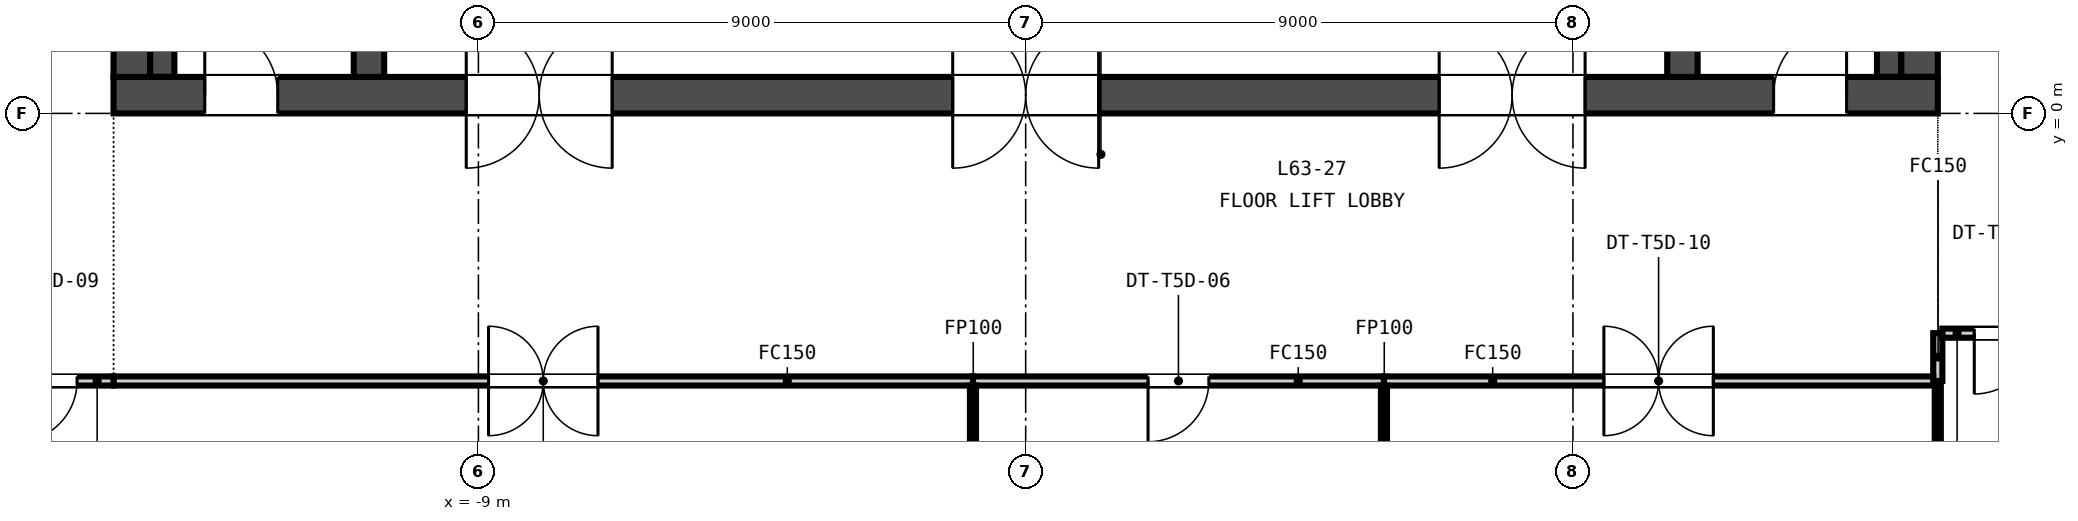
"""IFC4 building model, lengths in metres.
Left out: names, types, materials, properties, quantities, classifications, styles, units other than length and angle.
Written with IfcOpenShell. Run it as: python <this file> out.ifc"""

import sys

from ifc_helpers import new_model, si_unit, direction, frame, frame_2d, origin, place, context, subcontext, project, spatial, rectangle, extrude, element, fill, save


model = new_model("IFC4")
c1 = context("Model", 3, precision=1e-05, world=origin(), true_north=direction((0.0, 1.0)))
c2 = subcontext(c1, "Body", "Model", "MODEL_VIEW")
j1 = project(units=[si_unit("LENGTHUNIT", "METRE"), si_unit("PLANEANGLEUNIT", "RADIAN")], contexts=[c1])
p1 = place(None, origin())
s1 = spatial("IfcSite", under=j1, at=p1, CompositionType="ELEMENT")
p2 = place(p1, origin())
s2 = spatial("IfcBuilding", under=s1, at=p2, CompositionType="ELEMENT")
p3 = place(p2, frame((0.0, 0.0, 249.15)))
s3 = spatial("IfcBuildingStorey", under=s2, at=p3, CompositionType="ELEMENT", Elevation=249.15)
p4 = place(p3, frame((-15.0, 0.3, -0.15), z_axis=(0.0, 0.0, 1.0), x_axis=(1.0, 0.0, 0.0)))
e1 = element("IfcWall", 1, at=p4, inside=s3, PredefinedType="SOLIDWALL", context=c2, shape_type="SweptSolid", body=[
    extrude(rectangle(XDim=30.0, YDim=0.6, at=frame_2d((15.0, 0.0))), origin(), (0.0, 0.0, 1.0), 3.65),
])
p5 = place(p4, frame((5.8, 0.0, 0.15)))
e2 = element("IfcOpeningElement", 2, at=p5, cuts=e1, PredefinedType="OPENING", context=c2, shape_type="SweptSolid", body=[
    extrude(rectangle(XDim=2.4, YDim=2.4, at=frame_2d((1.2, 1.2))), frame((0.0, 0.31, 0.0), z_axis=(0.0, -1.0, 0.0), x_axis=(1.0, 0.0, 0.0)), (0.0, 0.0, 1.0), 0.62),
])
p6 = place(p4, frame((13.8, 0.0, 0.15)))
e3 = element("IfcOpeningElement", 3, at=p6, cuts=e1, PredefinedType="OPENING", context=c2, shape_type="SweptSolid", body=[
    extrude(rectangle(XDim=2.4, YDim=2.4, at=frame_2d((1.2, 1.2))), frame((0.0, 0.31, 0.0), z_axis=(0.0, -1.0, 0.0), x_axis=(1.0, 0.0, 0.0)), (0.0, 0.0, 1.0), 0.62),
])
p7 = place(p4, frame((21.8, 0.0, 0.15)))
e4 = element("IfcOpeningElement", 4, at=p7, cuts=e1, PredefinedType="OPENING", context=c2, shape_type="SweptSolid", body=[
    extrude(rectangle(XDim=2.4, YDim=2.4, at=frame_2d((1.2, 1.2))), frame((0.0, 0.31, 0.0), z_axis=(0.0, -1.0, 0.0), x_axis=(1.0, 0.0, 0.0)), (0.0, 0.0, 1.0), 0.62),
])
p8 = place(p4, frame((1.5, 0.0, 0.15)))
e5 = element("IfcOpeningElement", 5, at=p8, cuts=e1, PredefinedType="OPENING", context=c2, shape_type="SweptSolid", body=[
    extrude(rectangle(XDim=1.2, YDim=2.1, at=frame_2d((0.6, 1.05))), frame((0.0, 0.31, 0.0), z_axis=(0.0, -1.0, 0.0), x_axis=(1.0, 0.0, 0.0)), (0.0, 0.0, 1.0), 0.62),
])
p9 = place(p4, frame((27.3, 0.0, 0.15)))
e6 = element("IfcOpeningElement", 6, at=p9, cuts=e1, PredefinedType="OPENING", context=c2, shape_type="SweptSolid", body=[
    extrude(rectangle(XDim=1.2, YDim=2.1, at=frame_2d((0.6, 1.05))), frame((0.0, 0.31, 0.0), z_axis=(0.0, -1.0, 0.0), x_axis=(1.0, 0.0, 0.0)), (0.0, 0.0, 1.0), 0.62),
])
for number, where, z_axis, x_axis in (
    (7, (-14.7, 0.6, -0.15), (0.0, 0.0, 1.0), (0.0, 1.0, 0.0)),
    (8, (14.7, 0.6, -0.15), (0.0, 0.0, 1.0), (0.0, 1.0, 0.0)),
):
    element("IfcWall", number, at=place(p3, frame(where, z_axis=z_axis, x_axis=x_axis)), inside=s3, PredefinedType="SOLIDWALL", context=c2, shape_type="SweptSolid", body=[
        extrude(rectangle(XDim=13.8, YDim=0.6, at=frame_2d((6.9, 0.0))), origin(), (0.0, 0.0, 1.0), 3.65),
    ])
for number, where, z_axis, x_axis in (
    (9, (-10.8, 0.6, -0.15), (0.0, 0.0, 1.0), (0.0, 1.0, 0.0)),
    (10, (10.8, 0.6, -0.15), (0.0, 0.0, 1.0), (0.0, 1.0, 0.0)),
):
    element("IfcWall", number, at=place(p3, frame(where, z_axis=z_axis, x_axis=x_axis)), inside=s3, PredefinedType="SOLIDWALL", context=c2, shape_type="SweptSolid", body=[
        extrude(rectangle(XDim=13.8, YDim=0.5, at=frame_2d((6.9, 0.0))), origin(), (0.0, 0.0, 1.0), 3.65),
    ])
for number, where, z_axis, x_axis in (
    (11, (-14.2, 0.6, 0.0), (0.0, 0.0, 1.0), (0.0, 1.0, 0.0)),
    (12, (14.2, 0.6, 0.0), (0.0, 0.0, 1.0), (0.0, 1.0, 0.0)),
):
    element("IfcWall", number, at=place(p3, frame(where, z_axis=z_axis, x_axis=x_axis)), inside=s3, PredefinedType="SOLIDWALL", context=c2, shape_type="SweptSolid", body=[
        extrude(rectangle(XDim=13.8, YDim=0.4, at=frame_2d((6.9, 0.0))), origin(), (0.0, 0.0, 1.0), 3.5),
    ])
p10 = place(p3, frame((5.892, -4.4, 0.0), z_axis=(0.0, 0.0, 1.0), x_axis=(-1.0, 0.0, 0.0)))
e13 = element("IfcWall", 13, at=p10, inside=s3, PredefinedType="PARTITIONING", context=c2, shape_type="SweptSolid", body=[
    extrude(rectangle(XDim=6.759, YDim=0.15, at=frame_2d((3.379, 0.0))), origin(), (0.0, 0.0, 1.0), 2.751),
])
p11 = place(p10, frame((2.879, 0.0, 0.0)))
e14 = element("IfcOpeningElement", 14, at=p11, cuts=e13, PredefinedType="OPENING", context=c2, shape_type="SweptSolid", body=[
    extrude(rectangle(XDim=1.0, YDim=2.1, at=frame_2d((0.5, 1.05))), frame((0.0, 0.085, 0.0), z_axis=(0.0, -1.0, 0.0), x_axis=(1.0, 0.0, 0.0)), (0.0, 0.0, 1.0), 0.17),
])
p12 = place(p3, frame((15.0, -3.614, 0.0), z_axis=(0.0, 0.0, 1.0), x_axis=(0.0, -1.0, 0.0)))
e15 = element("IfcWall", 15, at=p12, inside=s3, PredefinedType="PARTITIONING", context=c2, shape_type="SweptSolid", body=[
    extrude(rectangle(XDim=0.786, YDim=0.15, at=frame_2d((0.393, 0.0))), origin(), (0.0, 0.0, 1.0), 2.751),
])
p13 = place(p3, frame((-0.867, -4.4, 0.0), z_axis=(0.0, 0.0, 1.0), x_axis=(-1.0, 0.0, 0.0)))
e16 = element("IfcWall", 16, at=p13, inside=s3, PredefinedType="PARTITIONING", context=c2, shape_type="SweptSolid", body=[
    extrude(rectangle(XDim=14.133, YDim=0.15, at=frame_2d((7.066, 0.0))), origin(), (0.0, 0.0, 1.0), 2.751),
])
p14 = place(p13, frame((6.167, 0.0, 0.0)))
e17 = element("IfcOpeningElement", 17, at=p14, cuts=e16, PredefinedType="OPENING", context=c2, shape_type="SweptSolid", body=[
    extrude(rectangle(XDim=1.8, YDim=2.1, at=frame_2d((0.9, 1.05))), frame((0.0, 0.085, 0.0), z_axis=(0.0, -1.0, 0.0), x_axis=(1.0, 0.0, 0.0)), (0.0, 0.0, 1.0), 0.17),
])
p15 = place(p3, frame((14.925, -4.4, 0.0), z_axis=(0.0, 0.0, 1.0), x_axis=(-1.0, 0.0, 0.0)))
e18 = element("IfcWall", 18, at=p15, inside=s3, PredefinedType="PARTITIONING", context=c2, shape_type="SweptSolid", body=[
    extrude(rectangle(XDim=9.033, YDim=0.15, at=frame_2d((4.517, 0.0))), origin(), (0.0, 0.0, 1.0), 2.751),
])
p16 = place(p15, frame((3.616, 0.0, 0.0)))
e19 = element("IfcOpeningElement", 19, at=p16, cuts=e18, PredefinedType="OPENING", context=c2, shape_type="SweptSolid", body=[
    extrude(rectangle(XDim=1.8, YDim=2.1, at=frame_2d((0.9, 1.05))), frame((0.0, 0.085, 0.0), z_axis=(0.0, -1.0, 0.0), x_axis=(1.0, 0.0, 0.0)), (0.0, 0.0, 1.0), 0.17),
])
p17 = place(p3, frame((17.125, -3.614, 0.0), z_axis=(0.0, 0.0, 1.0), x_axis=(-1.0, 0.0, 0.0)))
e20 = element("IfcWall", 20, at=p17, inside=s3, PredefinedType="PARTITIONING", context=c2, shape_type="SweptSolid", body=[
    extrude(rectangle(XDim=2.05, YDim=0.15, at=frame_2d((1.025, 0.0))), origin(), (0.0, 0.0, 1.0), 2.751),
])
p18 = place(p17, frame((0.525, 0.0, 0.0)))
e21 = element("IfcOpeningElement", 21, at=p18, cuts=e20, PredefinedType="OPENING", context=c2, shape_type="SweptSolid", body=[
    extrude(rectangle(XDim=1.0, YDim=2.1, at=frame_2d((0.5, 1.05))), frame((0.0, 0.085, 0.0), z_axis=(0.0, -1.0, 0.0), x_axis=(1.0, 0.0, 0.0)), (0.0, 0.0, 1.0), 0.17),
])
p19 = place(p3, frame((-15.0, -4.4, 0.0), z_axis=(0.0, 0.0, 1.0), x_axis=(-1.0, 0.0, 0.0)))
e22 = element("IfcWall", 22, at=p19, inside=s3, PredefinedType="PARTITIONING", context=c2, shape_type="SweptSolid", body=[
    extrude(rectangle(XDim=2.2, YDim=0.15, at=frame_2d((1.1, 0.0))), origin(), (0.0, 0.0, 1.0), 2.751),
])
p20 = place(p19, frame((0.6, 0.0, 0.0)))
e23 = element("IfcOpeningElement", 23, at=p20, cuts=e22, PredefinedType="OPENING", context=c2, shape_type="SweptSolid", body=[
    extrude(rectangle(XDim=1.0, YDim=2.1, at=frame_2d((0.5, 1.05))), frame((0.0, 0.085, 0.0), z_axis=(0.0, -1.0, 0.0), x_axis=(1.0, 0.0, 0.0)), (0.0, 0.0, 1.0), 0.17),
])
for number, where, z_axis, x_axis in (
    (24, (5.892, -8.85, 0.0), (0.0, 0.0, 1.0), (0.0, 1.0, 0.0)),
    (25, (-0.867, -8.85, 0.0), (0.0, 0.0, 1.0), (0.0, 1.0, 0.0)),
):
    element("IfcWall", number, at=place(p3, frame(where, z_axis=z_axis, x_axis=x_axis)), inside=s3, PredefinedType="PARTITIONING", context=c2, shape_type="SweptSolid", body=[
        extrude(rectangle(XDim=4.375, YDim=0.1, at=frame_2d((2.188, 0.0))), origin(), (0.0, 0.0, 1.0), 2.751),
    ])
p21 = place(p3, frame((15.0, -8.685, 0.0), z_axis=(0.0, 0.0, 1.0), x_axis=(0.0, 1.0, 0.0)))
e26 = element("IfcWall", 26, at=p21, inside=s3, PredefinedType="PARTITIONING", context=c2, shape_type="SweptSolid", body=[
    extrude(rectangle(XDim=4.21, YDim=0.1, at=frame_2d((2.105, 0.0))), origin(), (0.0, 0.0, 1.0), 2.751),
])
p22 = place(p5, origin())
e27 = element("IfcDoor", 27, at=p22, inside=s3, OperationType="DOUBLE_DOOR_DOUBLE_SWING", PredefinedType="DOOR", context=c2, shape_type="SweptSolid", body=[
    extrude(rectangle(XDim=2.4, YDim=2.4, at=frame_2d((1.2, 1.2))), frame((0.0, 0.025, 0.0), z_axis=(0.0, -1.0, 0.0), x_axis=(1.0, 0.0, 0.0)), (0.0, 0.0, 1.0), 0.05),
])
fill(e2, e27)
p23 = place(p6, origin())
e28 = element("IfcDoor", 28, at=p23, inside=s3, OperationType="DOUBLE_DOOR_DOUBLE_SWING", PredefinedType="DOOR", context=c2, shape_type="SweptSolid", body=[
    extrude(rectangle(XDim=2.4, YDim=2.4, at=frame_2d((1.2, 1.2))), frame((0.0, 0.025, 0.0), z_axis=(0.0, -1.0, 0.0), x_axis=(1.0, 0.0, 0.0)), (0.0, 0.0, 1.0), 0.05),
])
fill(e3, e28)
p24 = place(p7, origin())
e29 = element("IfcDoor", 29, at=p24, inside=s3, OperationType="DOUBLE_DOOR_DOUBLE_SWING", PredefinedType="DOOR", context=c2, shape_type="SweptSolid", body=[
    extrude(rectangle(XDim=2.4, YDim=2.4, at=frame_2d((1.2, 1.2))), frame((0.0, 0.025, 0.0), z_axis=(0.0, -1.0, 0.0), x_axis=(1.0, 0.0, 0.0)), (0.0, 0.0, 1.0), 0.05),
])
fill(e4, e29)
p25 = place(p8, origin())
e30 = element("IfcDoor", 30, at=p25, inside=s3, OperationType="SINGLE_SWING_LEFT", PredefinedType="DOOR", context=c2, shape_type="SweptSolid", body=[
    extrude(rectangle(XDim=1.2, YDim=2.1, at=frame_2d((0.6, 1.05))), frame((0.0, 0.025, 0.0), z_axis=(0.0, -1.0, 0.0), x_axis=(1.0, 0.0, 0.0)), (0.0, 0.0, 1.0), 0.05),
])
fill(e5, e30)
p26 = place(p9, origin())
e31 = element("IfcDoor", 31, at=p26, inside=s3, OperationType="SINGLE_SWING_RIGHT", PredefinedType="DOOR", context=c2, shape_type="SweptSolid", body=[
    extrude(rectangle(XDim=1.2, YDim=2.1, at=frame_2d((0.6, 1.05))), frame((0.0, 0.025, 0.0), z_axis=(0.0, -1.0, 0.0), x_axis=(1.0, 0.0, 0.0)), (0.0, 0.0, 1.0), 0.05),
])
fill(e6, e31)
p27 = place(p11, origin())
e32 = element("IfcDoor", 32, at=p27, inside=s3, OperationType="SINGLE_SWING_RIGHT", PredefinedType="DOOR", context=c2, shape_type="SweptSolid", body=[
    extrude(rectangle(XDim=1.0, YDim=2.1, at=frame_2d((0.5, 1.05))), frame((0.0, 0.025, 0.0), z_axis=(0.0, -1.0, 0.0), x_axis=(1.0, 0.0, 0.0)), (0.0, 0.0, 1.0), 0.05),
])
fill(e14, e32)
p28 = place(p18, origin())
e33 = element("IfcDoor", 33, at=p28, inside=s3, OperationType="SINGLE_SWING_RIGHT", PredefinedType="DOOR", context=c2, shape_type="SweptSolid", body=[
    extrude(rectangle(XDim=1.0, YDim=2.1, at=frame_2d((0.5, 1.05))), frame((0.0, 0.025, 0.0), z_axis=(0.0, -1.0, 0.0), x_axis=(1.0, 0.0, 0.0)), (0.0, 0.0, 1.0), 0.05),
])
fill(e21, e33)
p29 = place(p14, origin())
e34 = element("IfcDoor", 34, at=p29, inside=s3, OperationType="DOUBLE_DOOR_DOUBLE_SWING", PredefinedType="DOOR", context=c2, shape_type="SweptSolid", body=[
    extrude(rectangle(XDim=1.8, YDim=2.1, at=frame_2d((0.9, 1.05))), frame((0.0, 0.025, 0.0), z_axis=(0.0, -1.0, 0.0), x_axis=(1.0, 0.0, 0.0)), (0.0, 0.0, 1.0), 0.05),
])
fill(e17, e34)
p30 = place(p20, origin())
e35 = element("IfcDoor", 35, at=p30, inside=s3, OperationType="SINGLE_SWING_RIGHT", PredefinedType="DOOR", context=c2, shape_type="SweptSolid", body=[
    extrude(rectangle(XDim=1.0, YDim=2.1, at=frame_2d((0.5, 1.05))), frame((0.0, 0.025, 0.0), z_axis=(0.0, -1.0, 0.0), x_axis=(1.0, 0.0, 0.0)), (0.0, 0.0, 1.0), 0.05),
])
fill(e23, e35)
p31 = place(p16, origin())
e36 = element("IfcDoor", 36, at=p31, inside=s3, OperationType="DOUBLE_DOOR_DOUBLE_SWING", PredefinedType="DOOR", context=c2, shape_type="SweptSolid", body=[
    extrude(rectangle(XDim=1.8, YDim=2.1, at=frame_2d((0.9, 1.05))), frame((0.0, 0.025, 0.0), z_axis=(0.0, -1.0, 0.0), x_axis=(1.0, 0.0, 0.0)), (0.0, 0.0, 1.0), 0.05),
])
fill(e19, e36)
save(model, sys.argv[1])
